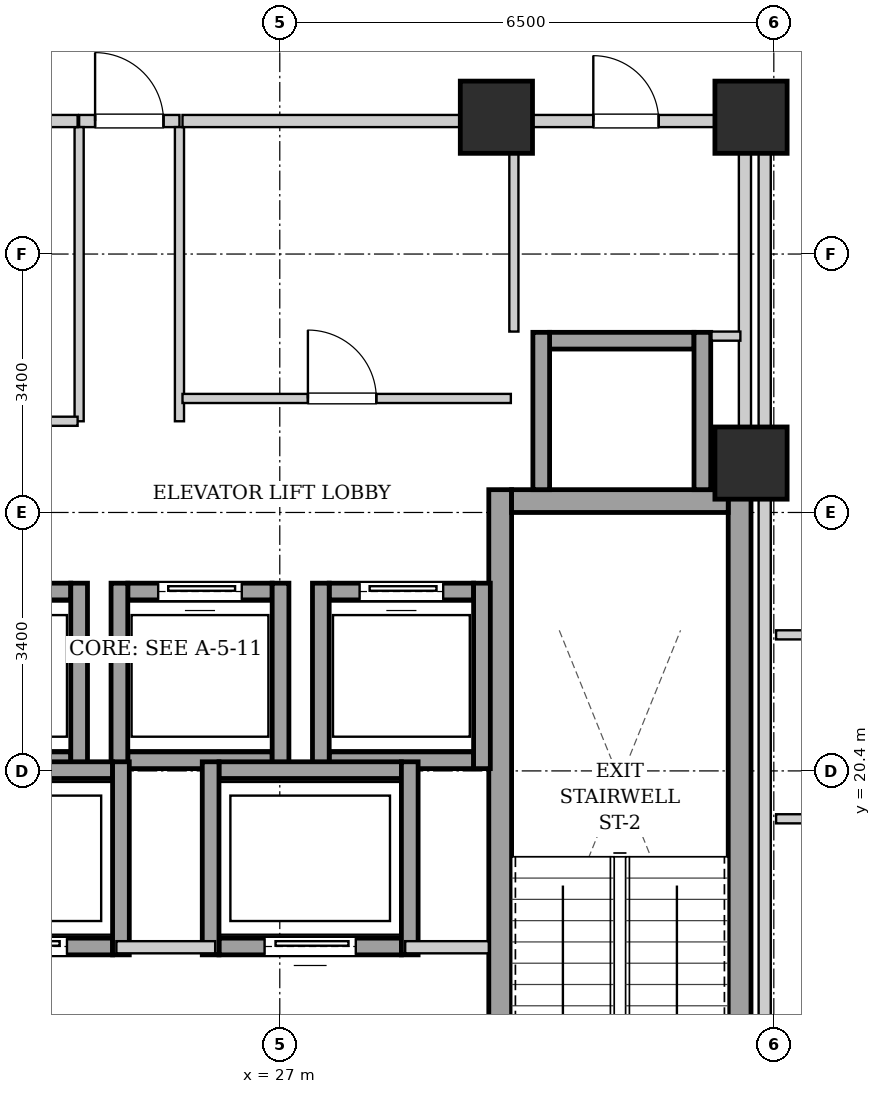
"""IFC4 building model, lengths in metres.
Left out: names, types, materials, properties, quantities, classifications, styles, units other than length and angle.
Written with IfcOpenShell. Run it as: python <this file> out.ifc"""

import sys

from ifc_helpers import new_model, si_unit, direction, frame, frame_2d, origin, origin_2d, place, context, subcontext, project, spatial, rectangle, extrude, element, fill, save


model = new_model("IFC4")
c1 = context("Model", 3, precision=1e-05, world=origin(), true_north=direction((0.0, 1.0)))
c2 = subcontext(c1, "Body", "Model", "MODEL_VIEW")
j1 = project(units=[si_unit("LENGTHUNIT", "METRE"), si_unit("PLANEANGLEUNIT", "RADIAN")], contexts=[c1])
p1 = place(None, origin())
s1 = spatial("IfcSite", under=j1, at=p1, CompositionType="ELEMENT")
p2 = place(p1, origin())
s2 = spatial("IfcBuilding", under=s1, at=p2, CompositionType="ELEMENT")
p3 = place(p2, frame((0.0, 0.0, 147.15)))
s3 = spatial("IfcBuildingStorey", under=s2, at=p3, CompositionType="ELEMENT", Elevation=147.15)
for number, where, z_axis, x_axis in (
    (1, (29.85, 29.0, 0.0), (0.0, 0.0, 1.0), (1.0, 0.0, 0.0)),
    (2, (33.2, 29.0, 0.0), (0.0, 0.0, 1.0), (1.0, 0.0, 0.0)),
    (3, (33.2, 24.45, 0.0), (0.0, 0.0, 1.0), (1.0, 0.0, 0.0)),
):
    element("IfcColumn", number, at=place(p3, frame(where, z_axis=z_axis, x_axis=x_axis)), inside=s3, PredefinedType="COLUMN", context=c2, shape_type="SweptSolid", body=[
        extrude(rectangle(XDim=0.95, YDim=0.95, at=origin_2d()), origin(), (0.0, 0.0, 1.0), 3.25),
    ])
for number, where, z_axis, x_axis in (
    (4, (29.9, 15.1, 0.0), (0.0, 0.0, 1.0), (0.0, 1.0, 0.0)),
    (5, (33.05, 15.1, 0.0), (0.0, 0.0, 1.0), (0.0, 1.0, 0.0)),
):
    element("IfcWall", number, at=place(p3, frame(where, z_axis=z_axis, x_axis=x_axis)), inside=s3, PredefinedType="SHEAR", context=c2, shape_type="SweptSolid", body=[
        extrude(rectangle(XDim=9.0, YDim=0.3, at=frame_2d((4.5, 0.0))), origin(), (0.0, 0.0, 1.0), 2.99),
    ])
p4 = place(p3, frame((30.05, 23.95, 0.0), z_axis=(0.0, 0.0, 1.0), x_axis=(1.0, 0.0, 0.0)))
e6 = element("IfcWall", 6, at=p4, inside=s3, PredefinedType="SHEAR", context=c2, shape_type="SweptSolid", body=[
    extrude(rectangle(XDim=2.85, YDim=0.3, at=frame_2d((1.425, 0.0))), origin(), (0.0, 0.0, 1.0), 2.99),
])
p5 = place(p3, frame((22.35, 20.54, 0.0), z_axis=(0.0, 0.0, 1.0), x_axis=(1.0, 0.0, 0.0)))
e7 = element("IfcWall", 7, at=p5, inside=s3, PredefinedType="SHEAR", context=c2, shape_type="SweptSolid", body=[
    extrude(rectangle(XDim=1.9, YDim=0.22, at=frame_2d((0.95, 0.0))), origin(), (0.0, 0.0, 1.0), 2.99),
])
p6 = place(p3, frame((22.35, 22.76, 0.0), z_axis=(0.0, 0.0, 1.0), x_axis=(1.0, 0.0, 0.0)))
e8 = element("IfcWall", 8, at=p6, inside=s3, PredefinedType="SHEAR", context=c2, shape_type="SweptSolid", body=[
    extrude(rectangle(XDim=1.9, YDim=0.22, at=frame_2d((0.95, 0.0))), origin(), (0.0, 0.0, 1.0), 2.99),
])
p7 = place(p6, frame((0.4, 0.0, 0.0)))
e9 = element("IfcOpeningElement", 9, at=p7, cuts=e8, PredefinedType="OPENING", context=c2, shape_type="SweptSolid", body=[
    extrude(rectangle(XDim=1.1, YDim=2.15, at=frame_2d((0.55, 1.075))), frame((0.0, 0.12, 0.0), z_axis=(0.0, -1.0, 0.0), x_axis=(1.0, 0.0, 0.0)), (0.0, 0.0, 1.0), 0.24),
])
p8 = place(p3, frame((24.36, 20.43, 0.0), z_axis=(0.0, 0.0, 1.0), x_axis=(0.0, 1.0, 0.0)))
e10 = element("IfcWall", 10, at=p8, inside=s3, PredefinedType="SHEAR", context=c2, shape_type="SweptSolid", body=[
    extrude(rectangle(XDim=2.44, YDim=0.22, at=frame_2d((1.22, 0.0))), origin(), (0.0, 0.0, 1.0), 2.99),
])
p9 = place(p3, frame((25.0, 20.54, 0.0), z_axis=(0.0, 0.0, 1.0), x_axis=(1.0, 0.0, 0.0)))
e11 = element("IfcWall", 11, at=p9, inside=s3, PredefinedType="SHEAR", context=c2, shape_type="SweptSolid", body=[
    extrude(rectangle(XDim=1.9, YDim=0.22, at=frame_2d((0.95, 0.0))), origin(), (0.0, 0.0, 1.0), 2.99),
])
p10 = place(p3, frame((25.0, 22.76, 0.0), z_axis=(0.0, 0.0, 1.0), x_axis=(1.0, 0.0, 0.0)))
e12 = element("IfcWall", 12, at=p10, inside=s3, PredefinedType="SHEAR", context=c2, shape_type="SweptSolid", body=[
    extrude(rectangle(XDim=1.9, YDim=0.22, at=frame_2d((0.95, 0.0))), origin(), (0.0, 0.0, 1.0), 2.99),
])
p11 = place(p10, frame((0.4, 0.0, 0.0)))
e13 = element("IfcOpeningElement", 13, at=p11, cuts=e12, PredefinedType="OPENING", context=c2, shape_type="SweptSolid", body=[
    extrude(rectangle(XDim=1.1, YDim=2.15, at=frame_2d((0.55, 1.075))), frame((0.0, 0.12, 0.0), z_axis=(0.0, -1.0, 0.0), x_axis=(1.0, 0.0, 0.0)), (0.0, 0.0, 1.0), 0.24),
])
for number, where, z_axis, x_axis in (
    (14, (24.89, 20.43, 0.0), (0.0, 0.0, 1.0), (0.0, 1.0, 0.0)),
    (15, (27.01, 20.43, 0.0), (0.0, 0.0, 1.0), (0.0, 1.0, 0.0)),
):
    element("IfcWall", number, at=place(p3, frame(where, z_axis=z_axis, x_axis=x_axis)), inside=s3, PredefinedType="SHEAR", context=c2, shape_type="SweptSolid", body=[
        extrude(rectangle(XDim=2.44, YDim=0.22, at=frame_2d((1.22, 0.0))), origin(), (0.0, 0.0, 1.0), 2.99),
    ])
p12 = place(p3, frame((27.65, 20.54, 0.0), z_axis=(0.0, 0.0, 1.0), x_axis=(1.0, 0.0, 0.0)))
e16 = element("IfcWall", 16, at=p12, inside=s3, PredefinedType="SHEAR", context=c2, shape_type="SweptSolid", body=[
    extrude(rectangle(XDim=1.9, YDim=0.22, at=frame_2d((0.95, 0.0))), origin(), (0.0, 0.0, 1.0), 2.99),
])
p13 = place(p3, frame((27.65, 22.76, 0.0), z_axis=(0.0, 0.0, 1.0), x_axis=(1.0, 0.0, 0.0)))
e17 = element("IfcWall", 17, at=p13, inside=s3, PredefinedType="SHEAR", context=c2, shape_type="SweptSolid", body=[
    extrude(rectangle(XDim=1.9, YDim=0.22, at=frame_2d((0.95, 0.0))), origin(), (0.0, 0.0, 1.0), 2.99),
])
p14 = place(p13, frame((0.4, 0.0, 0.0)))
e18 = element("IfcOpeningElement", 18, at=p14, cuts=e17, PredefinedType="OPENING", context=c2, shape_type="SweptSolid", body=[
    extrude(rectangle(XDim=1.1, YDim=2.15, at=frame_2d((0.55, 1.075))), frame((0.0, 0.12, 0.0), z_axis=(0.0, -1.0, 0.0), x_axis=(1.0, 0.0, 0.0)), (0.0, 0.0, 1.0), 0.24),
])
for number, where, z_axis, x_axis in (
    (19, (27.54, 20.43, 0.0), (0.0, 0.0, 1.0), (0.0, 1.0, 0.0)),
    (20, (29.66, 20.43, 0.0), (0.0, 0.0, 1.0), (0.0, 1.0, 0.0)),
):
    element("IfcWall", number, at=place(p3, frame(where, z_axis=z_axis, x_axis=x_axis)), inside=s3, PredefinedType="SHEAR", context=c2, shape_type="SweptSolid", body=[
        extrude(rectangle(XDim=2.44, YDim=0.22, at=frame_2d((1.22, 0.0))), origin(), (0.0, 0.0, 1.0), 2.99),
    ])
p15 = place(p3, frame((30.55, 26.06, 0.0), z_axis=(0.0, 0.0, 1.0), x_axis=(1.0, 0.0, 0.0)))
e21 = element("IfcWall", 21, at=p15, inside=s3, PredefinedType="SHEAR", context=c2, shape_type="SweptSolid", body=[
    extrude(rectangle(XDim=1.9, YDim=0.22, at=frame_2d((0.95, 0.0))), origin(), (0.0, 0.0, 1.0), 2.99),
])
for number, where, z_axis, x_axis in (
    (22, (30.44, 24.1, 0.0), (0.0, 0.0, 1.0), (0.0, 1.0, 0.0)),
    (23, (32.56, 24.1, 0.0), (0.0, 0.0, 1.0), (0.0, 1.0, 0.0)),
):
    element("IfcWall", number, at=place(p3, frame(where, z_axis=z_axis, x_axis=x_axis)), inside=s3, PredefinedType="SHEAR", context=c2, shape_type="SweptSolid", body=[
        extrude(rectangle(XDim=2.07, YDim=0.22, at=frame_2d((1.035, 0.0))), origin(), (0.0, 0.0, 1.0), 2.99),
    ])
p16 = place(p3, frame((22.4, 18.09, 0.0), z_axis=(0.0, 0.0, 1.0), x_axis=(1.0, 0.0, 0.0)))
e24 = element("IfcWall", 24, at=p16, inside=s3, PredefinedType="SHEAR", context=c2, shape_type="SweptSolid", body=[
    extrude(rectangle(XDim=2.4, YDim=0.22, at=frame_2d((1.2, 0.0))), origin(), (0.0, 0.0, 1.0), 2.99),
])
p17 = place(p16, frame((0.6, 0.0, 0.0)))
e25 = element("IfcOpeningElement", 25, at=p17, cuts=e24, PredefinedType="OPENING", context=c2, shape_type="SweptSolid", body=[
    extrude(rectangle(XDim=1.2, YDim=2.15, at=frame_2d((0.6, 1.075))), frame((0.0, 0.12, 0.0), z_axis=(0.0, -1.0, 0.0), x_axis=(1.0, 0.0, 0.0)), (0.0, 0.0, 1.0), 0.24),
])
p18 = place(p3, frame((22.4, 20.41, 0.0), z_axis=(0.0, 0.0, 1.0), x_axis=(1.0, 0.0, 0.0)))
e26 = element("IfcWall", 26, at=p18, inside=s3, PredefinedType="SHEAR", context=c2, shape_type="SweptSolid", body=[
    extrude(rectangle(XDim=2.4, YDim=0.22, at=frame_2d((1.2, 0.0))), origin(), (0.0, 0.0, 1.0), 2.99),
])
p19 = place(p3, frame((24.91, 17.98, 0.0), z_axis=(0.0, 0.0, 1.0), x_axis=(0.0, 1.0, 0.0)))
e27 = element("IfcWall", 27, at=p19, inside=s3, PredefinedType="SHEAR", context=c2, shape_type="SweptSolid", body=[
    extrude(rectangle(XDim=2.54, YDim=0.22, at=frame_2d((1.27, 0.0))), origin(), (0.0, 0.0, 1.0), 2.99),
])
p20 = place(p3, frame((26.2, 18.09, 0.0), z_axis=(0.0, 0.0, 1.0), x_axis=(1.0, 0.0, 0.0)))
e28 = element("IfcWall", 28, at=p20, inside=s3, PredefinedType="SHEAR", context=c2, shape_type="SweptSolid", body=[
    extrude(rectangle(XDim=2.4, YDim=0.22, at=frame_2d((1.2, 0.0))), origin(), (0.0, 0.0, 1.0), 2.99),
])
p21 = place(p20, frame((0.6, 0.0, 0.0)))
e29 = element("IfcOpeningElement", 29, at=p21, cuts=e28, PredefinedType="OPENING", context=c2, shape_type="SweptSolid", body=[
    extrude(rectangle(XDim=1.2, YDim=2.15, at=frame_2d((0.6, 1.075))), frame((0.0, 0.12, 0.0), z_axis=(0.0, -1.0, 0.0), x_axis=(1.0, 0.0, 0.0)), (0.0, 0.0, 1.0), 0.24),
])
p22 = place(p3, frame((26.2, 20.41, 0.0), z_axis=(0.0, 0.0, 1.0), x_axis=(1.0, 0.0, 0.0)))
e30 = element("IfcWall", 30, at=p22, inside=s3, PredefinedType="SHEAR", context=c2, shape_type="SweptSolid", body=[
    extrude(rectangle(XDim=2.4, YDim=0.22, at=frame_2d((1.2, 0.0))), origin(), (0.0, 0.0, 1.0), 2.99),
])
for number, where, z_axis, x_axis in (
    (31, (26.09, 17.98, 0.0), (0.0, 0.0, 1.0), (0.0, 1.0, 0.0)),
    (32, (28.71, 17.98, 0.0), (0.0, 0.0, 1.0), (0.0, 1.0, 0.0)),
):
    element("IfcWall", number, at=place(p3, frame(where, z_axis=z_axis, x_axis=x_axis)), inside=s3, PredefinedType="SHEAR", context=c2, shape_type="SweptSolid", body=[
        extrude(rectangle(XDim=2.54, YDim=0.22, at=frame_2d((1.27, 0.0))), origin(), (0.0, 0.0, 1.0), 2.99),
    ])
p23 = place(p3, frame((24.85, 18.08, 0.0), z_axis=(0.0, 0.0, 1.0), x_axis=(1.0, 0.0, 0.0)))
e33 = element("IfcWall", 33, at=p23, inside=s3, PredefinedType="PARTITIONING", context=c2, shape_type="SweptSolid", body=[
    extrude(rectangle(XDim=1.3, YDim=0.16, at=frame_2d((0.65, 0.0))), origin(), (0.0, 0.0, 1.0), 2.99),
])
p24 = place(p3, frame((28.65, 18.08, 0.0), z_axis=(0.0, 0.0, 1.0), x_axis=(1.0, 0.0, 0.0)))
e34 = element("IfcWall", 34, at=p24, inside=s3, PredefinedType="PARTITIONING", context=c2, shape_type="SweptSolid", body=[
    extrude(rectangle(XDim=1.1, YDim=0.16, at=frame_2d((0.55, 0.0))), origin(), (0.0, 0.0, 1.0), 2.99),
])
p25 = place(p3, frame((33.12, 24.12, 0.0), z_axis=(0.0, 0.0, 1.0), x_axis=(0.0, 1.0, 0.0)))
e35 = element("IfcWall", 35, at=p25, inside=s3, PredefinedType="PARTITIONING", context=c2, shape_type="SweptSolid", body=[
    extrude(rectangle(XDim=4.76, YDim=0.16, at=frame_2d((2.38, 0.0))), origin(), (0.0, 0.0, 1.0), 2.325),
])
p26 = place(p3, frame((24.36, 28.95, 0.0), z_axis=(0.0, 0.0, 1.0), x_axis=(1.0, 0.0, 0.0)))
e36 = element("IfcWall", 36, at=p26, inside=s3, PredefinedType="PARTITIONING", context=c2, shape_type="SweptSolid", body=[
    extrude(rectangle(XDim=1.32, YDim=0.16, at=frame_2d((0.66, 0.0))), origin(), (0.0, 0.0, 1.0), 2.442),
])
p27 = place(p26, frame((0.21, 0.0, 0.0)))
e37 = element("IfcOpeningElement", 37, at=p27, cuts=e36, PredefinedType="OPENING", context=c2, shape_type="SweptSolid", body=[
    extrude(rectangle(XDim=0.9, YDim=2.05, at=frame_2d((0.45, 1.025))), frame((0.0, 0.09, 0.0), z_axis=(0.0, -1.0, 0.0), x_axis=(1.0, 0.0, 0.0)), (0.0, 0.0, 1.0), 0.18),
])
for number, where, z_axis, x_axis in (
    (38, (24.36, 25.0, 0.0), (0.0, 0.0, 1.0), (0.0, 1.0, 0.0)),
    (39, (25.68, 25.0, 0.0), (0.0, 0.0, 1.0), (0.0, 1.0, 0.0)),
):
    element("IfcWall", number, at=place(p3, frame(where, z_axis=z_axis, x_axis=x_axis)), inside=s3, PredefinedType="PARTITIONING", context=c2, shape_type="SweptSolid", body=[
        extrude(rectangle(XDim=3.87, YDim=0.12, at=frame_2d((1.935, 0.0))), origin(), (0.0, 0.0, 1.0), 2.99),
    ])
p28 = place(p3, frame((30.08, 26.18, 0.0), z_axis=(0.0, 0.0, 1.0), x_axis=(0.0, 1.0, 0.0)))
e40 = element("IfcWall", 40, at=p28, inside=s3, PredefinedType="PARTITIONING", context=c2, shape_type="SweptSolid", body=[
    extrude(rectangle(XDim=2.68, YDim=0.12, at=frame_2d((1.34, 0.0))), origin(), (0.0, 0.0, 1.0), 2.99),
])
p29 = place(p3, frame((32.68, 26.12, 0.0), z_axis=(0.0, 0.0, 1.0), x_axis=(1.0, 0.0, 0.0)))
e41 = element("IfcWall", 41, at=p29, inside=s3, PredefinedType="PARTITIONING", context=c2, shape_type="SweptSolid", body=[
    extrude(rectangle(XDim=0.38, YDim=0.12, at=frame_2d((0.19, 0.0))), origin(), (0.0, 0.0, 1.0), 2.99),
])
p30 = place(p3, frame((30.08, 28.95, 0.0), z_axis=(0.0, 0.0, 1.0), x_axis=(1.0, 0.0, 0.0)))
e42 = element("IfcWall", 42, at=p30, inside=s3, PredefinedType="PARTITIONING", context=c2, shape_type="SweptSolid", body=[
    extrude(rectangle(XDim=2.96, YDim=0.16, at=frame_2d((1.48, 0.0))), origin(), (0.0, 0.0, 1.0), 2.99),
])
p31 = place(p30, frame((1.045, 0.0, 0.0)))
e43 = element("IfcOpeningElement", 43, at=p31, cuts=e42, PredefinedType="OPENING", context=c2, shape_type="SweptSolid", body=[
    extrude(rectangle(XDim=0.86, YDim=2.05, at=frame_2d((0.43, 1.025))), frame((0.0, 0.09, 0.0), z_axis=(0.0, -1.0, 0.0), x_axis=(1.0, 0.0, 0.0)), (0.0, 0.0, 1.0), 0.18),
])
p32 = place(p3, frame((22.3, 25.0, 0.0), z_axis=(0.0, 0.0, 1.0), x_axis=(1.0, 0.0, 0.0)))
e44 = element("IfcWall", 44, at=p32, inside=s3, PredefinedType="PARTITIONING", context=c2, shape_type="SweptSolid", body=[
    extrude(rectangle(XDim=2.04, YDim=0.12, at=frame_2d((1.02, 0.0))), origin(), (0.0, 0.0, 1.0), 2.99),
])
p33 = place(p3, frame((22.28, 28.95, 0.0), z_axis=(0.0, 0.0, 1.0), x_axis=(1.0, 0.0, 0.0)))
e45 = element("IfcWall", 45, at=p33, inside=s3, PredefinedType="PARTITIONING", context=c2, shape_type="SweptSolid", body=[
    extrude(rectangle(XDim=2.06, YDim=0.16, at=frame_2d((1.03, 0.0))), origin(), (0.0, 0.0, 1.0), 2.442),
])
p34 = place(p33, frame((0.62, 0.0, 0.0)))
e46 = element("IfcOpeningElement", 46, at=p34, cuts=e45, PredefinedType="OPENING", context=c2, shape_type="SweptSolid", body=[
    extrude(rectangle(XDim=0.86, YDim=2.05, at=frame_2d((0.43, 1.025))), frame((0.0, 0.09, 0.0), z_axis=(0.0, -1.0, 0.0), x_axis=(1.0, 0.0, 0.0)), (0.0, 0.0, 1.0), 0.18),
])
p35 = place(p3, frame((25.72, 28.95, 0.0), z_axis=(0.0, 0.0, 1.0), x_axis=(1.0, 0.0, 0.0)))
e47 = element("IfcWall", 47, at=p35, inside=s3, PredefinedType="PARTITIONING", context=c2, shape_type="SweptSolid", body=[
    extrude(rectangle(XDim=4.32, YDim=0.16, at=frame_2d((2.16, 0.0))), origin(), (0.0, 0.0, 1.0), 2.442),
])
p36 = place(p3, frame((25.72, 25.3, 0.0), z_axis=(0.0, 0.0, 1.0), x_axis=(1.0, 0.0, 0.0)))
e48 = element("IfcWall", 48, at=p36, inside=s3, PredefinedType="PARTITIONING", context=c2, shape_type="SweptSolid", body=[
    extrude(rectangle(XDim=4.32, YDim=0.12, at=frame_2d((2.16, 0.0))), origin(), (0.0, 0.0, 1.0), 2.99),
])
p37 = place(p36, frame((1.65, 0.0, 0.0)))
e49 = element("IfcOpeningElement", 49, at=p37, cuts=e48, PredefinedType="OPENING", context=c2, shape_type="SweptSolid", body=[
    extrude(rectangle(XDim=0.9, YDim=2.05, at=frame_2d((0.45, 1.025))), frame((0.0, 0.07, 0.0), z_axis=(0.0, -1.0, 0.0), x_axis=(1.0, 0.0, 0.0)), (0.0, 0.0, 1.0), 0.14),
])
p38 = place(p3, frame((33.53, 22.19, 0.0), z_axis=(0.0, 0.0, 1.0), x_axis=(1.0, 0.0, 0.0)))
e50 = element("IfcWall", 50, at=p38, inside=s3, PredefinedType="PARTITIONING", context=c2, shape_type="SweptSolid", body=[
    extrude(rectangle(XDim=2.45, YDim=0.12, at=frame_2d((1.225, 0.0))), origin(), (0.0, 0.0, 1.0), 2.99),
])
p39 = place(p3, frame((33.53, 19.77, 0.0), z_axis=(0.0, 0.0, 1.0), x_axis=(1.0, 0.0, 0.0)))
e51 = element("IfcWall", 51, at=p39, inside=s3, PredefinedType="PARTITIONING", context=c2, shape_type="SweptSolid", body=[
    extrude(rectangle(XDim=2.45, YDim=0.12, at=frame_2d((1.225, 0.0))), origin(), (0.0, 0.0, 1.0), 2.99),
])
p40 = place(p39, frame((0.795, 0.0, 0.0)))
e52 = element("IfcOpeningElement", 52, at=p40, cuts=e51, PredefinedType="OPENING", context=c2, shape_type="SweptSolid", body=[
    extrude(rectangle(XDim=0.86, YDim=2.05, at=frame_2d((0.43, 1.025))), frame((0.0, 0.07, 0.0), z_axis=(0.0, -1.0, 0.0), x_axis=(1.0, 0.0, 0.0)), (0.0, 0.0, 1.0), 0.14),
])
p41 = place(p3, frame((33.38, 15.02, 0.0), z_axis=(0.0, 0.0, 1.0), x_axis=(0.0, 1.0, 0.0)))
e53 = element("IfcWall", 53, at=p41, inside=s3, PredefinedType="PARTITIONING", context=c2, shape_type="SweptSolid", body=[
    extrude(rectangle(XDim=13.98, YDim=0.16, at=frame_2d((6.99, 0.0))), origin(), (0.0, 0.0, 1.0), 2.325),
])
p42 = place(p11, origin())
e54 = element("IfcDoor", 54, at=p42, inside=s3, OperationType="SLIDING_TO_LEFT", PredefinedType="DOOR", context=c2, shape_type="SweptSolid", body=[
    extrude(rectangle(XDim=1.1, YDim=2.15, at=frame_2d((0.55, 1.075))), frame((0.0, 0.025, 0.0), z_axis=(0.0, -1.0, 0.0), x_axis=(1.0, 0.0, 0.0)), (0.0, 0.0, 1.0), 0.05),
])
fill(e13, e54)
p43 = place(p14, origin())
e55 = element("IfcDoor", 55, at=p43, inside=s3, OperationType="SLIDING_TO_LEFT", PredefinedType="DOOR", context=c2, shape_type="SweptSolid", body=[
    extrude(rectangle(XDim=1.1, YDim=2.15, at=frame_2d((0.55, 1.075))), frame((0.0, 0.025, 0.0), z_axis=(0.0, -1.0, 0.0), x_axis=(1.0, 0.0, 0.0)), (0.0, 0.0, 1.0), 0.05),
])
fill(e18, e55)
p44 = place(p17, origin())
e56 = element("IfcDoor", 56, at=p44, inside=s3, OperationType="SLIDING_TO_LEFT", PredefinedType="DOOR", context=c2, shape_type="SweptSolid", body=[
    extrude(rectangle(XDim=1.2, YDim=2.15, at=frame_2d((0.6, 1.075))), frame((0.0, 0.025, 0.0), z_axis=(0.0, -1.0, 0.0), x_axis=(1.0, 0.0, 0.0)), (0.0, 0.0, 1.0), 0.05),
])
fill(e25, e56)
p45 = place(p21, origin())
e57 = element("IfcDoor", 57, at=p45, inside=s3, OperationType="SLIDING_TO_LEFT", PredefinedType="DOOR", context=c2, shape_type="SweptSolid", body=[
    extrude(rectangle(XDim=1.2, YDim=2.15, at=frame_2d((0.6, 1.075))), frame((0.0, 0.025, 0.0), z_axis=(0.0, -1.0, 0.0), x_axis=(1.0, 0.0, 0.0)), (0.0, 0.0, 1.0), 0.05),
])
fill(e29, e57)
p46 = place(p27, origin())
e58 = element("IfcDoor", 58, at=p46, inside=s3, OperationType="SINGLE_SWING_LEFT", PredefinedType="DOOR", context=c2, shape_type="SweptSolid", body=[
    extrude(rectangle(XDim=0.9, YDim=2.05, at=frame_2d((0.45, 1.025))), frame((0.0, 0.025, 0.0), z_axis=(0.0, -1.0, 0.0), x_axis=(1.0, 0.0, 0.0)), (0.0, 0.0, 1.0), 0.05),
])
fill(e37, e58)
p47 = place(p31, origin())
e59 = element("IfcDoor", 59, at=p47, inside=s3, OperationType="SINGLE_SWING_LEFT", PredefinedType="DOOR", context=c2, shape_type="SweptSolid", body=[
    extrude(rectangle(XDim=0.86, YDim=2.05, at=frame_2d((0.43, 1.025))), frame((0.0, 0.025, 0.0), z_axis=(0.0, -1.0, 0.0), x_axis=(1.0, 0.0, 0.0)), (0.0, 0.0, 1.0), 0.05),
])
fill(e43, e59)
p48 = place(p37, origin())
e60 = element("IfcDoor", 60, at=p48, inside=s3, OperationType="SINGLE_SWING_LEFT", PredefinedType="DOOR", context=c2, shape_type="SweptSolid", body=[
    extrude(rectangle(XDim=0.9, YDim=2.05, at=frame_2d((0.45, 1.025))), frame((0.0, 0.025, 0.0), z_axis=(0.0, -1.0, 0.0), x_axis=(1.0, 0.0, 0.0)), (0.0, 0.0, 1.0), 0.05),
])
fill(e49, e60)
save(model, sys.argv[1])
